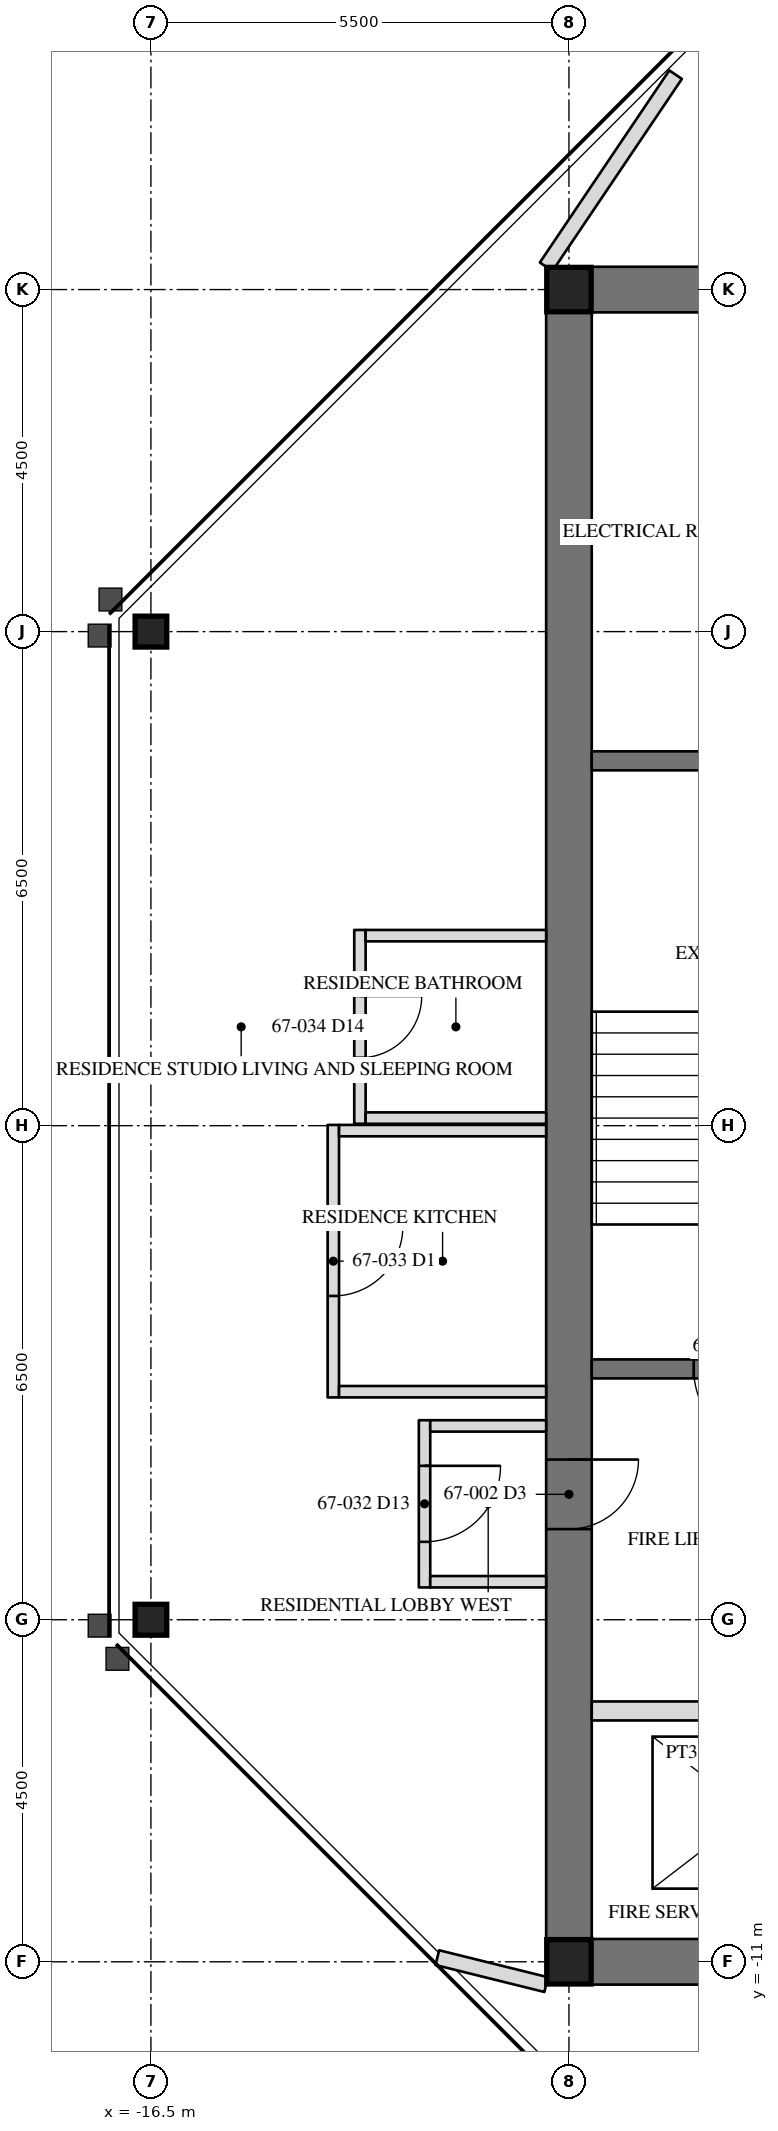
"""IFC4 building model, lengths in metres.
Left out: names, types, materials, properties, quantities, classifications, styles, units other than length and angle.
Written with IfcOpenShell. Run it as: python <this file> out.ifc"""

import sys

from ifc_helpers import new_model, si_unit, direction, frame, frame_2d, origin, origin_2d, place, context, subcontext, project, spatial, rectangle, hollow_rectangle, i_section, extrude, element, fill, save


model = new_model("IFC4")
c1 = context("Model", 3, precision=1e-05, world=origin(), true_north=direction((0.0, 1.0)))
c2 = subcontext(c1, "Body", "Model", "MODEL_VIEW")
j1 = project(units=[si_unit("LENGTHUNIT", "METRE"), si_unit("PLANEANGLEUNIT", "RADIAN")], contexts=[c1])
p1 = place(None, origin())
s1 = spatial("IfcSite", under=j1, at=p1, CompositionType="ELEMENT")
p2 = place(p1, origin())
s2 = spatial("IfcBuilding", under=s1, at=p2, CompositionType="ELEMENT")
p3 = place(p2, frame((0.0, 0.0, 274.0)))
s3 = spatial("IfcBuildingStorey", under=s2, at=p3, CompositionType="ELEMENT", Elevation=274.0)
for number, where, z_axis, x_axis in (
    (1, (-16.5, -6.5, 0.0), (0.0, 0.0, 1.0), (0.0, 1.0, 0.0)),
    (2, (-16.5, 6.5, 0.0), (0.0, 0.0, 1.0), (0.0, 1.0, 0.0)),
):
    element("IfcColumn", number, at=place(p3, frame(where, z_axis=z_axis, x_axis=x_axis)), inside=s3, PredefinedType="COLUMN", context=c2, shape_type="SweptSolid", body=[
        extrude(i_section(OverallWidth=0.406, OverallDepth=0.417, WebThickness=0.03, FlangeThickness=0.048, at=origin_2d()), origin(), (0.0, 0.0, 1.0), 3.6),
    ])
p4 = place(p3, frame((-11.0, 11.0, 0.0), z_axis=(0.0, 0.0, 1.0), x_axis=(0.0, -1.0, 0.0)))
e3 = element("IfcWall", 3, at=p4, inside=s3, PredefinedType="SHEAR", context=c2, shape_type="SweptSolid", body=[
    extrude(rectangle(XDim=22.0, YDim=0.6, at=frame_2d((11.0, 0.0))), origin(), (0.0, 0.0, 1.0), 3.6),
])
p5 = place(p4, frame((15.393, 0.0, 0.0)))
e4 = element("IfcOpeningElement", 4, at=p5, cuts=e3, PredefinedType="OPENING", context=c2, shape_type="SweptSolid", body=[
    extrude(rectangle(XDim=0.915, YDim=2.134, at=frame_2d((0.458, 1.067))), frame((0.0, 0.31, 0.0), z_axis=(0.0, -1.0, 0.0), x_axis=(1.0, 0.0, 0.0)), (0.0, 0.0, 1.0), 0.62),
])
for number, where, z_axis, x_axis in (
    (5, (-6.5, 11.0, 0.0), (0.0, 0.0, 1.0), (-1.0, 0.0, 0.0)),
    (6, (-11.0, -11.0, 0.0), (0.0, 0.0, 1.0), (1.0, 0.0, 0.0)),
):
    element("IfcWall", number, at=place(p3, frame(where, z_axis=z_axis, x_axis=x_axis)), inside=s3, PredefinedType="SHEAR", context=c2, shape_type="SweptSolid", body=[
        extrude(rectangle(XDim=4.5, YDim=0.6, at=frame_2d((2.25, 0.0))), origin(), (0.0, 0.0, 1.0), 3.6),
    ])
for number, where, z_axis, x_axis in (
    (7, (-11.0, 11.0, 0.0), (0.0, 0.0, 1.0), (1.0, 0.0, 0.0)),
    (8, (-11.0, -11.0, 0.0), (0.0, 0.0, 1.0), (1.0, 0.0, 0.0)),
):
    element("IfcColumn", number, at=place(p3, frame(where, z_axis=z_axis, x_axis=x_axis)), inside=s3, PredefinedType="COLUMN", context=c2, shape_type="SweptSolid", body=[
        extrude(hollow_rectangle(XDim=0.584, YDim=0.584, WallThickness=0.051, at=origin_2d()), origin(), (0.0, 0.0, 1.0), 3.6),
    ])
p6 = place(p3, frame((-6.95, 4.8, 0.0), z_axis=(0.0, 0.0, 1.0), x_axis=(-1.0, 0.0, 0.0)))
e9 = element("IfcWall", 9, at=p6, inside=s3, PredefinedType="SOLIDWALL", context=c2, shape_type="SweptSolid", body=[
    extrude(rectangle(XDim=3.75, YDim=0.25, at=frame_2d((1.875, 0.0))), origin(), (0.0, 0.0, 1.0), 3.41),
])
p7 = place(p3, frame((-6.95, -3.2, 0.0), z_axis=(0.0, 0.0, 1.0), x_axis=(-1.0, 0.0, 0.0)))
e10 = element("IfcWall", 10, at=p7, inside=s3, PredefinedType="SOLIDWALL", context=c2, shape_type="SweptSolid", body=[
    extrude(rectangle(XDim=3.75, YDim=0.25, at=frame_2d((1.875, 0.0))), origin(), (0.0, 0.0, 1.0), 3.41),
])
p8 = place(p7, frame((1.342, 0.0, 0.0)))
e11 = element("IfcOpeningElement", 11, at=p8, cuts=e10, PredefinedType="OPENING", context=c2, shape_type="SweptSolid", body=[
    extrude(rectangle(XDim=1.067, YDim=2.134, at=frame_2d((0.533, 1.067))), frame((0.0, 0.135, 0.0), z_axis=(0.0, -1.0, 0.0), x_axis=(1.0, 0.0, 0.0)), (0.0, 0.0, 1.0), 0.27),
])
p9 = place(p3, frame((-6.95, -7.7, 0.0), z_axis=(0.0, 0.0, 1.0), x_axis=(-1.0, 0.0, 0.0)))
e12 = element("IfcWall", 12, at=p9, inside=s3, PredefinedType="PARTITIONING", context=c2, shape_type="SweptSolid", body=[
    extrude(rectangle(XDim=3.75, YDim=0.25, at=frame_2d((1.875, 0.0))), origin(), (0.0, 0.0, 1.0), 3.41),
])
p10 = place(p9, frame((0.45, 0.0, 0.0)))
e13 = element("IfcOpeningElement", 13, at=p10, cuts=e12, PredefinedType="OPENING", context=c2, shape_type="SweptSolid", body=[
    extrude(rectangle(XDim=1.219, YDim=2.134, at=frame_2d((0.609, 1.067))), frame((0.0, 0.135, 0.0), z_axis=(0.0, -1.0, 0.0), x_axis=(1.0, 0.0, 0.0)), (0.0, 0.0, 1.0), 0.27),
])
p11 = place(p3, frame((-11.3, 11.3, 0.0), z_axis=(0.0, 0.0, 1.0), x_axis=(0.558834300538, 0.829279340477, 0.0)))
e14 = element("IfcWall", 14, at=p11, inside=s3, PredefinedType="PARTITIONING", context=c2, shape_type="SweptSolid", body=[
    extrude(rectangle(XDim=3.048, YDim=0.2, at=frame_2d((1.524, 0.0))), origin(), (0.0, 0.0, 1.0), 2.704),
])
p12 = place(p3, frame((-11.3, -11.3, 0.0), z_axis=(0.0, 0.0, 1.0), x_axis=(-0.970646702169, 0.24050983258, 0.0)))
e15 = element("IfcWall", 15, at=p12, inside=s3, PredefinedType="PARTITIONING", context=c2, shape_type="SweptSolid", body=[
    extrude(rectangle(XDim=1.475, YDim=0.2, at=frame_2d((0.737, 0.0))), origin(), (0.0, 0.0, 1.0), 3.41),
])
p13 = place(p3, frame((-12.9, -3.875, 0.0), z_axis=(0.0, 0.0, 1.0), x_axis=(0.0, -1.0, 0.0)))
e16 = element("IfcWall", 16, at=p13, inside=s3, PredefinedType="PARTITIONING", context=c2, shape_type="SweptSolid", body=[
    extrude(rectangle(XDim=2.2, YDim=0.15, at=frame_2d((1.1, 0.0))), origin(), (0.0, 0.0, 1.0), 3.41),
])
p14 = place(p13, frame((0.6, 0.0, 0.0)))
e17 = element("IfcOpeningElement", 17, at=p14, cuts=e16, PredefinedType="OPENING", context=c2, shape_type="SweptSolid", body=[
    extrude(rectangle(XDim=1.0, YDim=2.134, at=frame_2d((0.5, 1.067))), frame((0.0, 0.085, 0.0), z_axis=(0.0, -1.0, 0.0), x_axis=(1.0, 0.0, 0.0)), (0.0, 0.0, 1.0), 0.17),
])
for number, where, z_axis, x_axis in (
    (18, (-11.3, -3.95, 0.0), (0.0, 0.0, 1.0), (-1.0, 0.0, 0.0)),
    (19, (-11.3, -6.0, 0.0), (0.0, 0.0, 1.0), (-1.0, 0.0, 0.0)),
):
    element("IfcWall", number, at=place(p3, frame(where, z_axis=z_axis, x_axis=x_axis)), inside=s3, PredefinedType="PARTITIONING", context=c2, shape_type="SweptSolid", body=[
        extrude(rectangle(XDim=1.525, YDim=0.15, at=frame_2d((0.762, 0.0))), origin(), (0.0, 0.0, 1.0), 3.41),
    ])
p15 = place(p3, frame((-14.1, 0.01, 0.0), z_axis=(0.0, 0.0, 1.0), x_axis=(0.0, -1.0, 0.0)))
e20 = element("IfcWall", 20, at=p15, inside=s3, PredefinedType="PARTITIONING", context=c2, shape_type="SweptSolid", body=[
    extrude(rectangle(XDim=3.585, YDim=0.15, at=frame_2d((1.792, 0.0))), origin(), (0.0, 0.0, 1.0), 3.41),
])
p16 = place(p15, frame((1.335, 0.0, 0.0)))
e21 = element("IfcOpeningElement", 21, at=p16, cuts=e20, PredefinedType="OPENING", context=c2, shape_type="SweptSolid", body=[
    extrude(rectangle(XDim=0.915, YDim=2.134, at=frame_2d((0.458, 1.067))), frame((0.0, 0.085, 0.0), z_axis=(0.0, -1.0, 0.0), x_axis=(1.0, 0.0, 0.0)), (0.0, 0.0, 1.0), 0.17),
])
p17 = place(p3, frame((-11.3, -0.065, 0.0), z_axis=(0.0, 0.0, 1.0), x_axis=(-1.0, 0.0, 0.0)))
e22 = element("IfcWall", 22, at=p17, inside=s3, PredefinedType="PARTITIONING", context=c2, shape_type="SweptSolid", body=[
    extrude(rectangle(XDim=2.725, YDim=0.15, at=frame_2d((1.362, 0.0))), origin(), (0.0, 0.0, 1.0), 2.709),
])
p18 = place(p3, frame((-11.3, -3.5, 0.0), z_axis=(0.0, 0.0, 1.0), x_axis=(-1.0, 0.0, 0.0)))
e23 = element("IfcWall", 23, at=p18, inside=s3, PredefinedType="PARTITIONING", context=c2, shape_type="SweptSolid", body=[
    extrude(rectangle(XDim=2.725, YDim=0.15, at=frame_2d((1.362, 0.0))), origin(), (0.0, 0.0, 1.0), 3.41),
])
p19 = place(p3, frame((-13.75, 2.575, 0.0), z_axis=(0.0, 0.0, 1.0), x_axis=(0.0, -1.0, 0.0)))
e24 = element("IfcWall", 24, at=p19, inside=s3, PredefinedType="PARTITIONING", context=c2, shape_type="SweptSolid", body=[
    extrude(rectangle(XDim=2.55, YDim=0.15, at=frame_2d((1.275, 0.0))), origin(), (0.0, 0.0, 1.0), 3.41),
])
p20 = place(p19, frame((0.868, 0.0, 0.0)))
e25 = element("IfcOpeningElement", 25, at=p20, cuts=e24, PredefinedType="OPENING", context=c2, shape_type="SweptSolid", body=[
    extrude(rectangle(XDim=0.813, YDim=2.032, at=frame_2d((0.406, 1.016))), frame((0.0, 0.085, 0.0), z_axis=(0.0, -1.0, 0.0), x_axis=(1.0, 0.0, 0.0)), (0.0, 0.0, 1.0), 0.17),
])
p21 = place(p3, frame((-11.3, 2.5, 0.0), z_axis=(0.0, 0.0, 1.0), x_axis=(-1.0, 0.0, 0.0)))
e26 = element("IfcWall", 26, at=p21, inside=s3, PredefinedType="PARTITIONING", context=c2, shape_type="SweptSolid", body=[
    extrude(rectangle(XDim=2.375, YDim=0.15, at=frame_2d((1.188, 0.0))), origin(), (0.0, 0.0, 1.0), 3.41),
])
p22 = place(p3, frame((-11.3, 0.1, 0.0), z_axis=(0.0, 0.0, 1.0), x_axis=(-1.0, 0.0, 0.0)))
e27 = element("IfcWall", 27, at=p22, inside=s3, PredefinedType="PARTITIONING", context=c2, shape_type="SweptSolid", body=[
    extrude(rectangle(XDim=2.375, YDim=0.15, at=frame_2d((1.188, 0.0))), origin(), (0.0, 0.0, 1.0), 2.709),
])
p23 = place(p5, origin())
e28 = element("IfcDoor", 28, at=p23, inside=s3, OperationType="SINGLE_SWING_RIGHT", PredefinedType="DOOR", context=c2, shape_type="SweptSolid", body=[
    extrude(rectangle(XDim=0.915, YDim=2.134, at=frame_2d((0.458, 1.067))), frame((0.0, -0.225, 0.0), z_axis=(0.0, -1.0, 0.0), x_axis=(1.0, 0.0, 0.0)), (0.0, 0.0, 1.0), 0.05),
])
fill(e4, e28)
p24 = place(p8, origin())
e29 = element("IfcDoor", 29, at=p24, inside=s3, OperationType="SINGLE_SWING_LEFT", PredefinedType="DOOR", context=c2, shape_type="SweptSolid", body=[
    extrude(rectangle(XDim=1.067, YDim=2.134, at=frame_2d((0.533, 1.067))), frame((0.0, 0.025, 0.0), z_axis=(0.0, -1.0, 0.0), x_axis=(1.0, 0.0, 0.0)), (0.0, 0.0, 1.0), 0.05),
])
fill(e11, e29)
p25 = place(p14, origin())
e30 = element("IfcDoor", 30, at=p25, inside=s3, OperationType="SINGLE_SWING_RIGHT", PredefinedType="DOOR", context=c2, shape_type="SweptSolid", body=[
    extrude(rectangle(XDim=1.0, YDim=2.134, at=frame_2d((0.5, 1.067))), frame((0.0, 0.025, 0.0), z_axis=(0.0, -1.0, 0.0), x_axis=(1.0, 0.0, 0.0)), (0.0, 0.0, 1.0), 0.05),
])
fill(e17, e30)
p26 = place(p16, origin())
e31 = element("IfcDoor", 31, at=p26, inside=s3, OperationType="SINGLE_SWING_LEFT", PredefinedType="DOOR", context=c2, shape_type="SweptSolid", body=[
    extrude(rectangle(XDim=0.915, YDim=2.134, at=frame_2d((0.458, 1.067))), frame((0.0, 0.025, 0.0), z_axis=(0.0, -1.0, 0.0), x_axis=(1.0, 0.0, 0.0)), (0.0, 0.0, 1.0), 0.05),
])
fill(e21, e31)
p27 = place(p20, origin())
e32 = element("IfcDoor", 32, at=p27, inside=s3, OperationType="SINGLE_SWING_LEFT", PredefinedType="DOOR", context=c2, shape_type="SweptSolid", body=[
    extrude(rectangle(XDim=0.813, YDim=2.032, at=frame_2d((0.406, 1.016))), frame((0.0, 0.025, 0.0), z_axis=(0.0, -1.0, 0.0), x_axis=(1.0, 0.0, 0.0)), (0.0, 0.0, 1.0), 0.05),
])
fill(e25, e32)
save(model, sys.argv[1])
